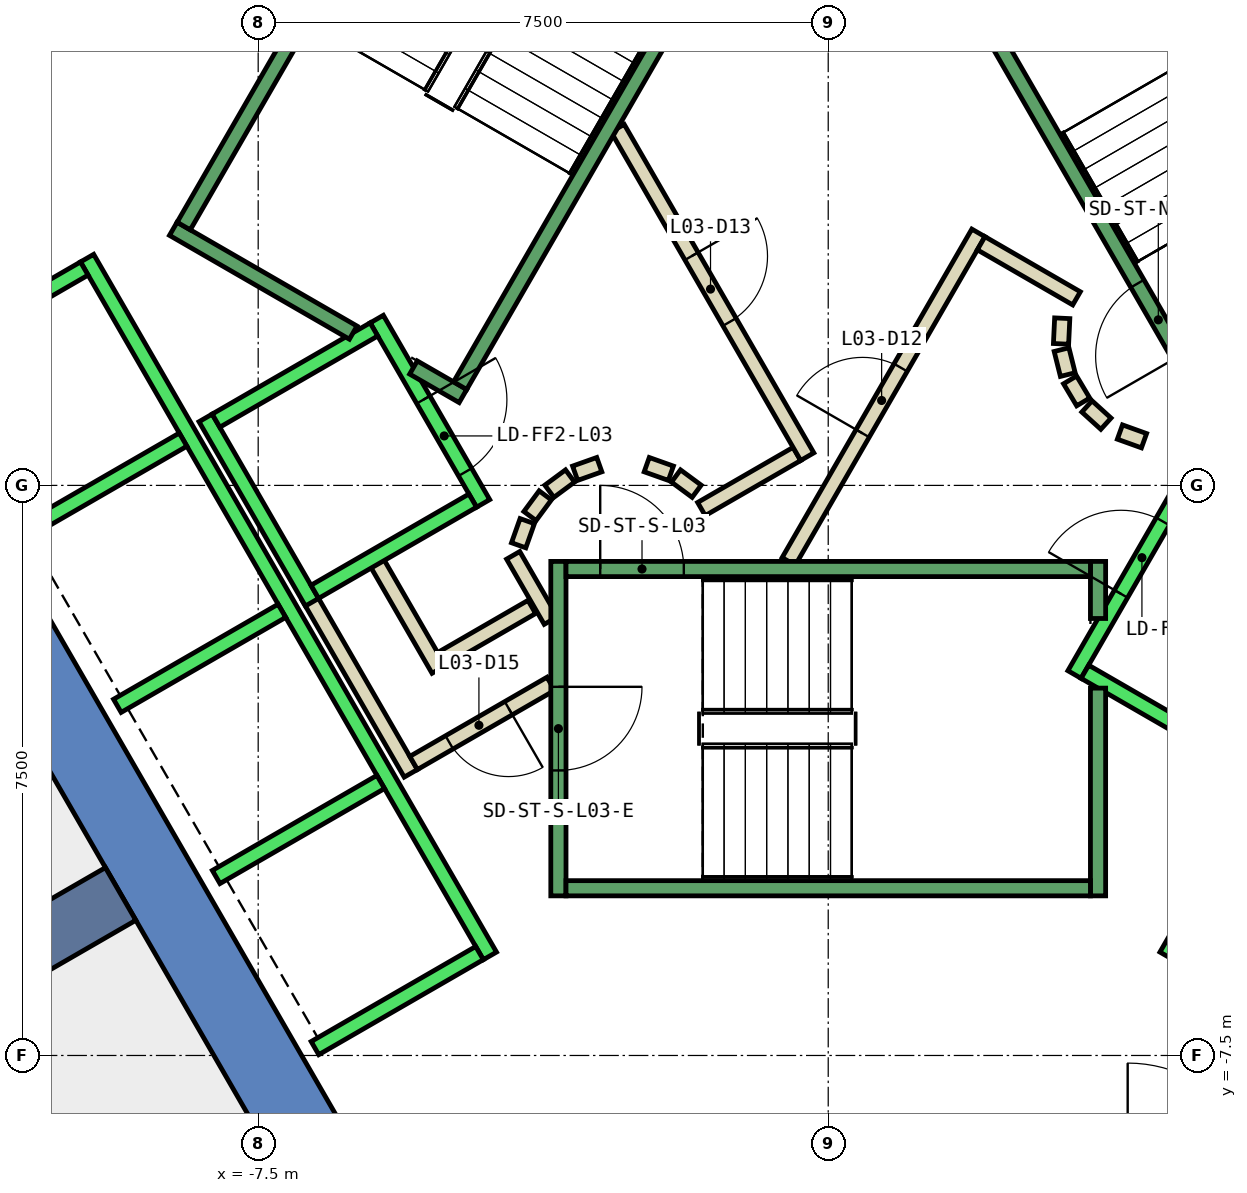
"""IFC4 building model, lengths in metres.
Left out: names, types, materials, properties, quantities, classifications, styles, units other than length and angle.
Written with IfcOpenShell. Run it as: python <this file> out.ifc"""

import sys

from ifc_helpers import new_model, si_unit, direction, frame, frame_2d, origin, place, context, subcontext, project, spatial, polyline, rectangle, outline, extrude, element, fill, save


model = new_model("IFC4")
c1 = context("Model", 3, precision=1e-05, world=origin(), true_north=direction((0.0, 1.0)))
c2 = subcontext(c1, "Body", "Model", "MODEL_VIEW")
j1 = project(units=[si_unit("LENGTHUNIT", "METRE"), si_unit("PLANEANGLEUNIT", "RADIAN")], contexts=[c1])
p1 = place(None, origin())
s1 = spatial("IfcSite", under=j1, at=p1, CompositionType="ELEMENT")
p2 = place(p1, origin())
s2 = spatial("IfcBuilding", under=s1, at=p2, CompositionType="ELEMENT")
p3 = place(p2, frame((0.0, 0.0, 20.0)))
s3 = spatial("IfcBuildingStorey", under=s2, at=p3, CompositionType="ELEMENT", Elevation=20.0)
p4 = place(p3, frame((0.0, 0.0, -0.45)))
e1 = element("IfcWall", 1, at=p4, inside=s3, PredefinedType="SHEAR", context=c2, shape_type="SweptSolid", body=[
    extrude(outline(polyline([(-12.267, 5.252), (-11.402, 4.752), (-6.351, 13.5), (-6.928, 14.5), (-12.267, 5.252)])), origin(), (0.0, 0.0, 1.0), 5.0),
])
p5 = place(p3, frame((0.0, 0.0, -0.45)))
e2 = element("IfcWall", 2, at=p5, inside=s3, PredefinedType="SHEAR", context=c2, shape_type="SweptSolid", body=[
    extrude(outline(polyline([(-13.856, 2.5), (-6.928, -9.5), (-6.351, -8.5), (-12.702, 2.5), (-13.856, 2.5)])), origin(), (0.0, 0.0, 1.0), 5.0),
])
p6 = place(p3, frame((-9.31, -5.375, -0.45), z_axis=(0.0, 0.0, 1.0), x_axis=(-0.866017533419, -0.500013631625, 0.0)))
e3 = element("IfcWall", 3, at=p6, inside=s3, PredefinedType="SHEAR", context=c2, shape_type="SweptSolid", body=[
    extrude(rectangle(XDim=9.0, YDim=0.8, at=frame_2d((4.5, 0.0))), origin(), (0.0, 0.0, 1.0), 5.0),
])
p7 = place(p3, frame((-3.9, -1.599, 0.0), z_axis=(0.0, 0.0, 1.0), x_axis=(-0.865969445389, -0.500096910261, 0.0)))
e4 = element("IfcWall", 4, at=p7, inside=s3, PredefinedType="PARTITIONING", context=c2, shape_type="SweptSolid", body=[
    extrude(rectangle(XDim=1.373, YDim=0.2, at=frame_2d((0.687, 0.0))), origin(), (0.0, 0.0, 1.0), 4.55),
])
p8 = place(p3, frame((-5.126, -2.422, 0.0), z_axis=(0.0, 0.0, 1.0), x_axis=(-0.500062241894, 0.865989465428, 0.0)))
e5 = element("IfcWall", 5, at=p8, inside=s3, PredefinedType="PARTITIONING", context=c2, shape_type="SweptSolid", body=[
    extrude(rectangle(XDim=1.7, YDim=0.2, at=frame_2d((0.85, 0.0))), origin(), (0.0, 0.0, 1.0), 4.55),
])
p9 = place(p3, frame((-5.492, -3.788, 0.0), z_axis=(0.0, 0.0, 1.0), x_axis=(-0.500008949224, 0.866020236886, 0.0)))
e6 = element("IfcWall", 6, at=p9, inside=s3, PredefinedType="PARTITIONING", context=c2, shape_type="SweptSolid", body=[
    extrude(rectangle(XDim=2.68, YDim=0.2, at=frame_2d((1.34, 0.0))), origin(), (0.0, 0.0, 1.0), 4.55),
])
p10 = place(p3, frame((-4.145, -0.92, 0.0), z_axis=(0.0, 0.0, 1.0), x_axis=(0.499743786207, -0.866173278362, 0.0)))
e7 = element("IfcWall", 7, at=p10, inside=s3, PredefinedType="PARTITIONING", context=c2, shape_type="SweptSolid", body=[
    extrude(rectangle(XDim=0.991, YDim=0.2, at=frame_2d((0.495, 0.0))), origin(), (0.0, 0.0, 1.0), 4.55),
])
p11 = place(p3, frame((-3.65, -2.61, 0.0), z_axis=(0.0, 0.0, 1.0), x_axis=(-0.866072462134, -0.499918483688, 0.0)))
e8 = element("IfcWall", 8, at=p11, inside=s3, PredefinedType="PARTITIONING", context=c2, shape_type="SweptSolid", body=[
    extrude(rectangle(XDim=2.084, YDim=0.2, at=frame_2d((1.042, 0.0))), origin(), (0.0, 0.0, 1.0), 4.55),
])
p12 = place(p11, frame((0.642, 0.0, 0.0)))
e9 = element("IfcOpeningElement", 9, at=p12, cuts=e8, PredefinedType="OPENING", context=c2, shape_type="SweptSolid", body=[
    extrude(rectangle(XDim=0.9, YDim=2.1, at=frame_2d((0.45, 1.05))), frame((0.0, 0.11, 0.0), z_axis=(0.0, -1.0, 0.0), x_axis=(1.0, 0.0, 0.0)), (0.0, 0.0, 1.0), 0.22),
])
p13 = place(p3, frame((3.079, 2.199, 0.0), z_axis=(0.0, 0.0, 1.0), x_axis=(-0.047771483479, -0.998858290933, 0.0)))
e10 = element("IfcWall", 10, at=p13, inside=s3, PredefinedType="PARTITIONING", context=c2, shape_type="SweptSolid", body=[
    extrude(rectangle(XDim=0.337, YDim=0.2, at=frame_2d((0.169, 0.0))), origin(), (0.0, 0.0, 1.0), 4.55),
])
p14 = place(p3, frame((3.07, 1.786, 0.0), z_axis=(0.0, 0.0, 1.0), x_axis=(0.242705583207, -0.970099994784, 0.0)))
e11 = element("IfcWall", 11, at=p14, inside=s3, PredefinedType="PARTITIONING", context=c2, shape_type="SweptSolid", body=[
    extrude(rectangle(XDim=0.338, YDim=0.2, at=frame_2d((0.169, 0.0))), origin(), (0.0, 0.0, 1.0), 4.55),
])
for number, where, z_axis, x_axis in (
    (12, (3.182, 1.388, 0.0), (0.0, 0.0, 1.0), (0.512, -0.859, 0.0)),
    (13, (3.404, 1.039, 0.0), (0.0, 0.0, 1.0), (0.74, -0.672, 0.0)),
):
    element("IfcWall", number, at=place(p3, frame(where, z_axis=z_axis, x_axis=x_axis)), inside=s3, PredefinedType="PARTITIONING", context=c2, shape_type="SweptSolid", body=[
        extrude(rectangle(XDim=0.338, YDim=0.2, at=frame_2d((0.169, 0.0))), origin(), (0.0, 0.0, 1.0), 4.55),
    ])
p15 = place(p3, frame((3.838, 0.702, 0.0), z_axis=(0.0, 0.0, 1.0), x_axis=(0.941035081519, -0.338308993895, 0.0)))
e14 = element("IfcWall", 14, at=p15, inside=s3, PredefinedType="PARTITIONING", context=c2, shape_type="SweptSolid", body=[
    extrude(rectangle(XDim=0.337, YDim=0.2, at=frame_2d((0.168, 0.0))), origin(), (0.0, 0.0, 1.0), 4.55),
])
p16 = place(p3, frame((-0.52, -1.0, 0.0), z_axis=(0.0, 0.0, 1.0), x_axis=(0.50011622646, 0.865958290007, 0.0)))
e15 = element("IfcWall", 15, at=p16, inside=s3, PredefinedType="PARTITIONING", context=c2, shape_type="SweptSolid", body=[
    extrude(rectangle(XDim=4.991, YDim=0.2, at=frame_2d((2.496, 0.0))), origin(), (0.0, 0.0, 1.0), 4.55),
])
p17 = place(p16, frame((1.945, 0.0, 0.0)))
e16 = element("IfcOpeningElement", 16, at=p17, cuts=e15, PredefinedType="OPENING", context=c2, shape_type="SweptSolid", body=[
    extrude(rectangle(XDim=1.0, YDim=2.1, at=frame_2d((0.5, 1.05))), frame((0.0, 0.11, 0.0), z_axis=(0.0, -1.0, 0.0), x_axis=(1.0, 0.0, 0.0)), (0.0, 0.0, 1.0), 0.22),
])
p18 = place(p3, frame((2.012, 3.186, 0.0), z_axis=(0.0, 0.0, 1.0), x_axis=(0.865891012941, -0.500232699559, 0.0)))
e17 = element("IfcWall", 17, at=p18, inside=s3, PredefinedType="PARTITIONING", context=c2, shape_type="SweptSolid", body=[
    extrude(rectangle(XDim=1.449, YDim=0.2, at=frame_2d((0.725, 0.0))), origin(), (0.0, 0.0, 1.0), 4.55),
])
p19 = place(p3, frame((-0.412, 0.414, 0.0), z_axis=(0.0, 0.0, 1.0), x_axis=(-0.866017369001, -0.500013916395, 0.0)))
e18 = element("IfcWall", 18, at=p19, inside=s3, PredefinedType="PARTITIONING", context=c2, shape_type="SweptSolid", body=[
    extrude(rectangle(XDim=1.45, YDim=0.2, at=frame_2d((0.725, 0.0))), origin(), (0.0, 0.0, 1.0), 4.55),
])
p20 = place(p3, frame((-1.731, -0.077, 0.0), z_axis=(0.0, 0.0, 1.0), x_axis=(-0.804311165252, 0.594208338422, 0.0)))
e19 = element("IfcWall", 19, at=p20, inside=s3, PredefinedType="PARTITIONING", context=c2, shape_type="SweptSolid", body=[
    extrude(rectangle(XDim=0.338, YDim=0.2, at=frame_2d((0.169, 0.0))), origin(), (0.0, 0.0, 1.0), 4.55),
])
p21 = place(p3, frame((-2.07, 0.16, 0.0), z_axis=(0.0, 0.0, 1.0), x_axis=(-0.942199461132, 0.335052496547, 0.0)))
e20 = element("IfcWall", 20, at=p21, inside=s3, PredefinedType="PARTITIONING", context=c2, shape_type="SweptSolid", body=[
    extrude(rectangle(XDim=0.337, YDim=0.2, at=frame_2d((0.169, 0.0))), origin(), (0.0, 0.0, 1.0), 4.55),
])
p22 = place(p3, frame((-3.012, 0.273, 0.0), z_axis=(0.0, 0.0, 1.0), x_axis=(-0.942280615813, -0.334824194261, 0.0)))
e21 = element("IfcWall", 21, at=p22, inside=s3, PredefinedType="PARTITIONING", context=c2, shape_type="SweptSolid", body=[
    extrude(rectangle(XDim=0.338, YDim=0.2, at=frame_2d((0.169, 0.0))), origin(), (0.0, 0.0, 1.0), 4.55),
])
p23 = place(p3, frame((-3.397, 0.124, 0.0), z_axis=(0.0, 0.0, 1.0), x_axis=(-0.804311165252, -0.594208338422, 0.0)))
e22 = element("IfcWall", 22, at=p23, inside=s3, PredefinedType="PARTITIONING", context=c2, shape_type="SweptSolid", body=[
    extrude(rectangle(XDim=0.338, YDim=0.2, at=frame_2d((0.169, 0.0))), origin(), (0.0, 0.0, 1.0), 4.55),
])
p24 = place(p3, frame((-3.723, -0.131, 0.0), z_axis=(0.0, 0.0, 1.0), x_axis=(-0.594675113454, -0.803966112121, 0.0)))
e23 = element("IfcWall", 23, at=p24, inside=s3, PredefinedType="PARTITIONING", context=c2, shape_type="SweptSolid", body=[
    extrude(rectangle(XDim=0.338, YDim=0.2, at=frame_2d((0.169, 0.0))), origin(), (0.0, 0.0, 1.0), 4.55),
])
p25 = place(p3, frame((-3.96, -0.47, 0.0), z_axis=(0.0, 0.0, 1.0), x_axis=(-0.334824194261, -0.942280615813, 0.0)))
e24 = element("IfcWall", 24, at=p25, inside=s3, PredefinedType="PARTITIONING", context=c2, shape_type="SweptSolid", body=[
    extrude(rectangle(XDim=0.338, YDim=0.2, at=frame_2d((0.169, 0.0))), origin(), (0.0, 0.0, 1.0), 4.55),
])
p26 = place(p3, frame((-2.771, 4.7, 0.0), z_axis=(0.0, 0.0, 1.0), x_axis=(0.499969479948, -0.866043023828, 0.0)))
e25 = element("IfcWall", 25, at=p26, inside=s3, PredefinedType="PARTITIONING", context=c2, shape_type="SweptSolid", body=[
    extrude(rectangle(XDim=4.99, YDim=0.2, at=frame_2d((2.495, 0.0))), origin(), (0.0, 0.0, 1.0), 4.55),
])
p27 = place(p26, frame((1.945, 0.0, 0.0)))
e26 = element("IfcOpeningElement", 26, at=p27, cuts=e25, PredefinedType="OPENING", context=c2, shape_type="SweptSolid", body=[
    extrude(rectangle(XDim=1.0, YDim=2.1, at=frame_2d((0.5, 1.05))), frame((0.0, 0.11, 0.0), z_axis=(0.0, -1.0, 0.0), x_axis=(1.0, 0.0, 0.0)), (0.0, 0.0, 1.0), 0.22),
])
p28 = place(p3, frame((-5.94, 2.188, 0.0), z_axis=(0.0, 0.0, 1.0), x_axis=(0.49994636267, -0.866056369097, 0.0)))
e27 = element("IfcWall", 27, at=p28, inside=s3, PredefinedType="STANDARD", context=c2, shape_type="SweptSolid", body=[
    extrude(rectangle(XDim=2.8, YDim=0.2, at=frame_2d((1.4, 0.0))), origin(), (0.0, 0.0, 1.0), 4.55),
])
p29 = place(p28, frame((1.225, 0.0, 0.0)))
e28 = element("IfcOpeningElement", 28, at=p29, cuts=e27, PredefinedType="OPENING", context=c2, shape_type="SweptSolid", body=[
    extrude(rectangle(XDim=1.1, YDim=2.1, at=frame_2d((0.55, 1.05))), frame((0.0, 0.11, 0.0), z_axis=(0.0, -1.0, 0.0), x_axis=(1.0, 0.0, 0.0)), (0.0, 0.0, 1.0), 0.22),
])
p30 = place(p3, frame((-8.192, 0.888, 0.0), z_axis=(0.0, 0.0, 1.0), x_axis=(0.49994636267, -0.866056369097, 0.0)))
e29 = element("IfcWall", 29, at=p30, inside=s3, PredefinedType="STANDARD", context=c2, shape_type="SweptSolid", body=[
    extrude(rectangle(XDim=2.8, YDim=0.2, at=frame_2d((1.4, 0.0))), origin(), (0.0, 0.0, 1.0), 4.55),
])
for number, where, z_axis, x_axis in (
    (30, (-5.977, 2.052, 0.0), (0.0, 0.0, 1.0), (-0.866, -0.5, 0.0)),
    (31, (-4.677, -0.2, 0.0), (0.0, 0.0, 1.0), (-0.866, -0.5, 0.0)),
):
    element("IfcWall", number, at=place(p3, frame(where, z_axis=z_axis, x_axis=x_axis)), inside=s3, PredefinedType="STANDARD", context=c2, shape_type="SweptSolid", body=[
        extrude(rectangle(XDim=2.399, YDim=0.2, at=frame_2d((1.2, 0.0))), origin(), (0.0, 0.0, 1.0), 4.55),
    ])
p31 = place(p3, frame((-9.751, 2.99, 0.0), z_axis=(0.0, 0.0, 1.0), x_axis=(0.50000090737, -0.866024879913, 0.0)))
e32 = element("IfcWall", 32, at=p31, inside=s3, PredefinedType="STANDARD", context=c2, shape_type="SweptSolid", body=[
    extrude(rectangle(XDim=10.6, YDim=0.2, at=frame_2d((5.3, 0.0))), origin(), (0.0, 0.0, 1.0), 4.55),
])
p32 = place(p3, frame((-9.788, 2.853, 0.0), z_axis=(0.0, 0.0, 1.0), x_axis=(-0.865998541277, -0.500046524342, 0.0)))
e33 = element("IfcWall", 33, at=p32, inside=s3, PredefinedType="STANDARD", context=c2, shape_type="SweptSolid", body=[
    extrude(rectangle(XDim=2.5, YDim=0.2, at=frame_2d((1.25, 0.0))), origin(), (0.0, 0.0, 1.0), 4.55),
])
for number, where, z_axis, x_axis in (
    (34, (-8.488, 0.602, 0.0), (0.0, 0.0, 1.0), (-0.866, -0.5, 0.0)),
    (35, (-7.188, -1.65, 0.0), (0.0, 0.0, 1.0), (-0.866, -0.5, 0.0)),
    (36, (-5.888, -3.902, 0.0), (0.0, 0.0, 1.0), (-0.866, -0.5, 0.0)),
    (37, (-4.588, -6.153, 0.0), (0.0, 0.0, 1.0), (-0.866, -0.5, 0.0)),
):
    element("IfcWall", number, at=place(p3, frame(where, z_axis=z_axis, x_axis=x_axis)), inside=s3, PredefinedType="STANDARD", context=c2, shape_type="SweptSolid", body=[
        extrude(rectangle(XDim=2.5, YDim=0.2, at=frame_2d((1.25, 0.0))), origin(), (0.0, 0.0, 1.0), 4.55),
    ])
p33 = place(p3, frame((3.24, -2.488, 0.0), z_axis=(0.0, 0.0, 1.0), x_axis=(0.49994636267, 0.866056369097, 0.0)))
e38 = element("IfcWall", 38, at=p33, inside=s3, PredefinedType="STANDARD", context=c2, shape_type="SweptSolid", body=[
    extrude(rectangle(XDim=2.8, YDim=0.2, at=frame_2d((1.4, 0.0))), origin(), (0.0, 0.0, 1.0), 4.55),
])
p34 = place(p33, frame((1.225, 0.0, 0.0)))
e39 = element("IfcOpeningElement", 39, at=p34, cuts=e38, PredefinedType="OPENING", context=c2, shape_type="SweptSolid", body=[
    extrude(rectangle(XDim=1.1, YDim=2.1, at=frame_2d((0.55, 1.05))), frame((0.0, 0.11, 0.0), z_axis=(0.0, -1.0, 0.0), x_axis=(1.0, 0.0, 0.0)), (0.0, 0.0, 1.0), 0.22),
])
p35 = place(p3, frame((3.377, -2.452, 0.0), z_axis=(0.0, 0.0, 1.0), x_axis=(0.865955154139, -0.50012165622, 0.0)))
e40 = element("IfcWall", 40, at=p35, inside=s3, PredefinedType="STANDARD", context=c2, shape_type="SweptSolid", body=[
    extrude(rectangle(XDim=2.4, YDim=0.2, at=frame_2d((1.2, 0.0))), origin(), (0.0, 0.0, 1.0), 4.55),
])
p36 = place(p3, frame((4.451, -6.19, 0.0), z_axis=(0.0, 0.0, 1.0), x_axis=(0.50000090737, 0.866024879913, 0.0)))
e41 = element("IfcWall", 41, at=p36, inside=s3, PredefinedType="STANDARD", context=c2, shape_type="SweptSolid", body=[
    extrude(rectangle(XDim=10.6, YDim=0.2, at=frame_2d((5.3, 0.0))), origin(), (0.0, 0.0, 1.0), 4.55),
])
p37 = place(p3, frame((-3.55, -1.0, 0.0), z_axis=(0.0, 0.0, 1.0), x_axis=(0.0, -1.0, 0.0)))
e42 = element("IfcWall", 42, at=p37, inside=s3, PredefinedType="STANDARD", context=c2, shape_type="SweptSolid", body=[
    extrude(rectangle(XDim=4.4, YDim=0.2, at=frame_2d((2.2, 0.0))), origin(), (0.0, 0.0, 1.0), 4.55),
])
p38 = place(p37, frame((1.65, 0.0, 0.0)))
e43 = element("IfcOpeningElement", 43, at=p38, cuts=e42, PredefinedType="OPENING", context=c2, shape_type="SweptSolid", body=[
    extrude(rectangle(XDim=1.1, YDim=2.2, at=frame_2d((0.55, 1.1))), frame((0.0, 0.11, 0.0), z_axis=(0.0, -1.0, 0.0), x_axis=(1.0, 0.0, 0.0)), (0.0, 0.0, 1.0), 0.22),
])
p39 = place(p3, frame((3.55, -2.667, 0.0), z_axis=(0.0, 0.0, 1.0), x_axis=(0.0, -1.0, 0.0)))
e44 = element("IfcWall", 44, at=p39, inside=s3, PredefinedType="STANDARD", context=c2, shape_type="SweptSolid", body=[
    extrude(rectangle(XDim=2.733, YDim=0.2, at=frame_2d((1.366, 0.0))), origin(), (0.0, 0.0, 1.0), 4.55),
])
p40 = place(p3, frame((3.55, -1.0, 0.0), z_axis=(0.0, 0.0, 1.0), x_axis=(0.0, -1.0, 0.0)))
e45 = element("IfcWall", 45, at=p40, inside=s3, PredefinedType="STANDARD", context=c2, shape_type="SweptSolid", body=[
    extrude(rectangle(XDim=0.751, YDim=0.2, at=frame_2d((0.375, 0.0))), origin(), (0.0, 0.0, 1.0), 4.55),
])
p41 = place(p3, frame((-3.45, -1.1, 0.0), z_axis=(0.0, 0.0, 1.0), x_axis=(1.0, 0.0, 0.0)))
e46 = element("IfcWall", 46, at=p41, inside=s3, PredefinedType="STANDARD", context=c2, shape_type="SweptSolid", body=[
    extrude(rectangle(XDim=6.9, YDim=0.2, at=frame_2d((3.45, 0.0))), origin(), (0.0, 0.0, 1.0), 4.55),
])
p42 = place(p41, frame((0.45, 0.0, 0.0)))
e47 = element("IfcOpeningElement", 47, at=p42, cuts=e46, PredefinedType="OPENING", context=c2, shape_type="SweptSolid", body=[
    extrude(rectangle(XDim=1.1, YDim=2.2, at=frame_2d((0.55, 1.1))), frame((0.0, 0.11, 0.0), z_axis=(0.0, -1.0, 0.0), x_axis=(1.0, 0.0, 0.0)), (0.0, 0.0, 1.0), 0.22),
])
p43 = place(p3, frame((-3.45, -5.3, 0.0), z_axis=(0.0, 0.0, 1.0), x_axis=(1.0, 0.0, 0.0)))
e48 = element("IfcWall", 48, at=p43, inside=s3, PredefinedType="STANDARD", context=c2, shape_type="SweptSolid", body=[
    extrude(rectangle(XDim=6.9, YDim=0.2, at=frame_2d((3.45, 0.0))), origin(), (0.0, 0.0, 1.0), 4.55),
])
p44 = place(p3, frame((4.843, 1.312, 0.0), z_axis=(0.0, 0.0, 1.0), x_axis=(-0.499963383562, 0.866046543262, 0.0)))
e49 = element("IfcWall", 49, at=p44, inside=s3, PredefinedType="STANDARD", context=c2, shape_type="SweptSolid", body=[
    extrude(rectangle(XDim=6.9, YDim=0.2, at=frame_2d((3.45, 0.0))), origin(), (0.0, 0.0, 1.0), 4.55),
])
p45 = place(p44, frame((0.45, 0.0, 0.0)))
e50 = element("IfcOpeningElement", 50, at=p45, cuts=e49, PredefinedType="OPENING", context=c2, shape_type="SweptSolid", body=[
    extrude(rectangle(XDim=1.1, YDim=2.2, at=frame_2d((0.55, 1.1))), frame((0.0, 0.11, 0.0), z_axis=(0.0, -1.0, 0.0), x_axis=(1.0, 0.0, 0.0)), (0.0, 0.0, 1.0), 0.22),
])
p46 = place(p3, frame((-6.25, 2.01, 0.0), z_axis=(0.0, 0.0, 1.0), x_axis=(-0.86611865017, 0.499838457731, 0.0)))
e51 = element("IfcWall", 51, at=p46, inside=s3, PredefinedType="STANDARD", context=c2, shape_type="SweptSolid", body=[
    extrude(rectangle(XDim=2.733, YDim=0.2, at=frame_2d((1.366, 0.0))), origin(), (0.0, 0.0, 1.0), 4.55),
])
p47 = place(p3, frame((-4.806, 1.176, 0.0), z_axis=(0.0, 0.0, 1.0), x_axis=(-0.866558586415, 0.499075361355, 0.0)))
e52 = element("IfcWall", 52, at=p47, inside=s3, PredefinedType="STANDARD", context=c2, shape_type="SweptSolid", body=[
    extrude(rectangle(XDim=0.751, YDim=0.2, at=frame_2d((0.376, 0.0))), origin(), (0.0, 0.0, 1.0), 4.55),
])
p48 = place(p3, frame((-1.393, 7.288, 0.0), z_axis=(0.0, 0.0, 1.0), x_axis=(-0.499963383562, -0.866046543262, 0.0)))
e53 = element("IfcWall", 53, at=p48, inside=s3, PredefinedType="STANDARD", context=c2, shape_type="SweptSolid", body=[
    extrude(rectangle(XDim=6.9, YDim=0.2, at=frame_2d((3.45, 0.0))), origin(), (0.0, 0.0, 1.0), 4.55),
])
p49 = place(p48, frame((0.45, 0.0, 0.0)))
e54 = element("IfcOpeningElement", 54, at=p49, cuts=e53, PredefinedType="OPENING", context=c2, shape_type="SweptSolid", body=[
    extrude(rectangle(XDim=1.1, YDim=2.2, at=frame_2d((0.55, 1.1))), frame((0.0, 0.11, 0.0), z_axis=(0.0, -1.0, 0.0), x_axis=(1.0, 0.0, 0.0)), (0.0, 0.0, 1.0), 0.22),
])
p50 = place(p3, frame((-5.03, 9.388, 0.0), z_axis=(0.0, 0.0, 1.0), x_axis=(-0.499978703459, -0.866037698999, 0.0)))
e55 = element("IfcWall", 55, at=p50, inside=s3, PredefinedType="STANDARD", context=c2, shape_type="SweptSolid", body=[
    extrude(rectangle(XDim=6.9, YDim=0.2, at=frame_2d((3.45, 0.0))), origin(), (0.0, 0.0, 1.0), 4.55),
])
p51 = place(p17, origin())
e56 = element("IfcDoor", 56, at=p51, inside=s3, OperationType="SINGLE_SWING_LEFT", PredefinedType="DOOR", context=c2, shape_type="SweptSolid", body=[
    extrude(rectangle(XDim=1.0, YDim=2.1, at=frame_2d((0.5, 1.05))), frame((0.0, 0.025, 0.0), z_axis=(0.0, -1.0, 0.0), x_axis=(1.0, 0.0, 0.0)), (0.0, 0.0, 1.0), 0.05),
])
fill(e16, e56)
p52 = place(p27, origin())
e57 = element("IfcDoor", 57, at=p52, inside=s3, OperationType="SINGLE_SWING_RIGHT", PredefinedType="DOOR", context=c2, shape_type="SweptSolid", body=[
    extrude(rectangle(XDim=1.0, YDim=2.1, at=frame_2d((0.5, 1.05))), frame((0.0, 0.025, 0.0), z_axis=(0.0, -1.0, 0.0), x_axis=(1.0, 0.0, 0.0)), (0.0, 0.0, 1.0), 0.05),
])
fill(e26, e57)
p53 = place(p12, origin())
e58 = element("IfcDoor", 58, at=p53, inside=s3, OperationType="SINGLE_SWING_LEFT", PredefinedType="DOOR", context=c2, shape_type="SweptSolid", body=[
    extrude(rectangle(XDim=0.9, YDim=2.1, at=frame_2d((0.45, 1.05))), frame((0.0, 0.025, 0.0), z_axis=(0.0, -1.0, 0.0), x_axis=(1.0, 0.0, 0.0)), (0.0, 0.0, 1.0), 0.05),
])
fill(e9, e58)
p54 = place(p34, origin())
e59 = element("IfcDoor", 59, at=p54, inside=s3, OperationType="SLIDING_TO_LEFT", PredefinedType="DOOR", context=c2, shape_type="SweptSolid", body=[
    extrude(rectangle(XDim=1.1, YDim=2.1, at=frame_2d((0.55, 1.05))), frame((0.0, 0.025, 0.0), z_axis=(0.0, -1.0, 0.0), x_axis=(1.0, 0.0, 0.0)), (0.0, 0.0, 1.0), 0.05),
])
fill(e39, e59)
p55 = place(p29, origin())
e60 = element("IfcDoor", 60, at=p55, inside=s3, OperationType="SLIDING_TO_LEFT", PredefinedType="DOOR", context=c2, shape_type="SweptSolid", body=[
    extrude(rectangle(XDim=1.1, YDim=2.1, at=frame_2d((0.55, 1.05))), frame((0.0, 0.025, 0.0), z_axis=(0.0, -1.0, 0.0), x_axis=(1.0, 0.0, 0.0)), (0.0, 0.0, 1.0), 0.05),
])
fill(e28, e60)
p56 = place(p42, origin())
e61 = element("IfcDoor", 61, at=p56, inside=s3, OperationType="SINGLE_SWING_LEFT", PredefinedType="DOOR", context=c2, shape_type="SweptSolid", body=[
    extrude(rectangle(XDim=1.1, YDim=2.2, at=frame_2d((0.55, 1.1))), frame((0.0, 0.025, 0.0), z_axis=(0.0, -1.0, 0.0), x_axis=(1.0, 0.0, 0.0)), (0.0, 0.0, 1.0), 0.05),
])
fill(e47, e61)
p57 = place(p38, origin())
e62 = element("IfcDoor", 62, at=p57, inside=s3, OperationType="SINGLE_SWING_LEFT", PredefinedType="DOOR", context=c2, shape_type="SweptSolid", body=[
    extrude(rectangle(XDim=1.1, YDim=2.2, at=frame_2d((0.55, 1.1))), frame((0.0, 0.025, 0.0), z_axis=(0.0, -1.0, 0.0), x_axis=(1.0, 0.0, 0.0)), (0.0, 0.0, 1.0), 0.05),
])
fill(e43, e62)
p58 = place(p45, origin())
e63 = element("IfcDoor", 63, at=p58, inside=s3, OperationType="SINGLE_SWING_LEFT", PredefinedType="DOOR", context=c2, shape_type="SweptSolid", body=[
    extrude(rectangle(XDim=1.1, YDim=2.2, at=frame_2d((0.55, 1.1))), frame((0.0, 0.025, 0.0), z_axis=(0.0, -1.0, 0.0), x_axis=(1.0, 0.0, 0.0)), (0.0, 0.0, 1.0), 0.05),
])
fill(e50, e63)
save(model, sys.argv[1])
